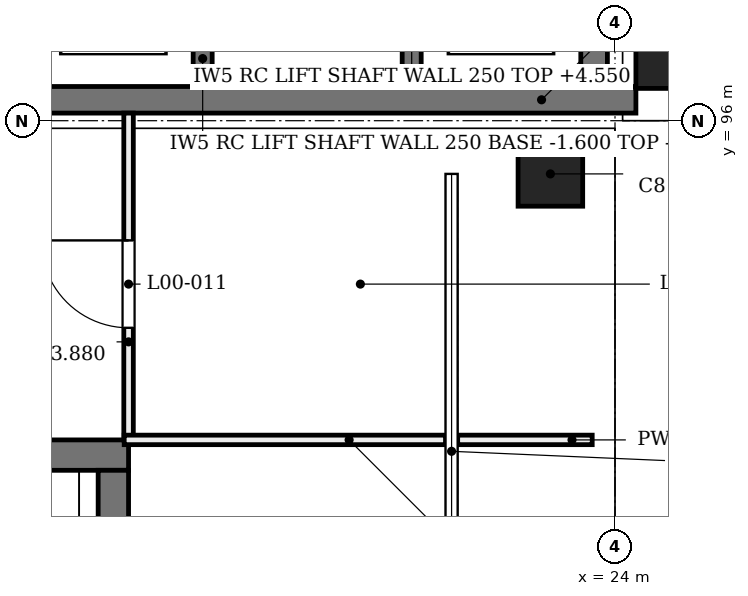
"""IFC4 building model, lengths in metres.
Left out: names, types, materials, properties, quantities, classifications, styles, units other than length and angle.
Written with IfcOpenShell. Run it as: python <this file> out.ifc"""

import sys

from ifc_helpers import new_model, si_unit, direction, frame, frame_2d, origin, origin_2d, place, context, subcontext, project, spatial, rectangle, extrude, element, fill, save


model = new_model("IFC4")
c1 = context("Model", 3, precision=1e-05, world=origin(), true_north=direction((0.0, 1.0)))
c2 = subcontext(c1, "Body", "Model", "MODEL_VIEW")
j1 = project(units=[si_unit("LENGTHUNIT", "METRE"), si_unit("PLANEANGLEUNIT", "RADIAN")], contexts=[c1])
p1 = place(None, origin())
s1 = spatial("IfcSite", under=j1, at=p1, CompositionType="ELEMENT")
p2 = place(p1, origin())
s2 = spatial("IfcBuilding", under=s1, at=p2, CompositionType="ELEMENT")
p3 = place(p2, origin())
s3 = spatial("IfcBuildingStorey", under=s2, at=p3, CompositionType="ELEMENT", Elevation=0.0)
p4 = place(p3, frame((8.4, 91.6, -1.6), z_axis=(0.0, 0.0, 1.0), x_axis=(1.0, 0.0, 0.0)))
e1 = element("IfcWall", 1, at=p4, inside=s3, PredefinedType="SHEAR", context=c2, shape_type="SweptSolid", body=[
    extrude(rectangle(XDim=9.2, YDim=0.4, at=frame_2d((4.6, 0.0))), origin(), (0.0, 0.0, 1.0), 6.18),
])
p5 = place(p4, frame((3.85, 0.0, 1.6)))
e2 = element("IfcOpeningElement", 2, at=p5, cuts=e1, PredefinedType="OPENING", context=c2, shape_type="SweptSolid", body=[
    extrude(rectangle(XDim=1.5, YDim=2.1, at=frame_2d((0.75, 1.05))), frame((0.0, 0.21, 0.0), z_axis=(0.0, -1.0, 0.0), x_axis=(1.0, 0.0, 0.0)), (0.0, 0.0, 1.0), 0.42),
])
p6 = place(p3, frame((17.4, 84.0, -1.6), z_axis=(0.0, 0.0, 1.0), x_axis=(0.0, 1.0, 0.0)))
e3 = element("IfcWall", 3, at=p6, inside=s3, PredefinedType="SHEAR", context=c2, shape_type="SweptSolid", body=[
    extrude(rectangle(XDim=7.4, YDim=0.4, at=frame_2d((3.7, 0.0))), origin(), (0.0, 0.0, 1.0), 6.18),
])
p7 = place(p6, frame((3.4, 0.0, 5.48)))
e4 = element("IfcOpeningElement", 4, at=p7, cuts=e3, PredefinedType="OPENING", context=c2, shape_type="SweptSolid", body=[
    extrude(rectangle(XDim=0.6, YDim=0.5, at=frame_2d((0.3, 0.25))), frame((0.0, 0.21, 0.0), z_axis=(0.0, -1.0, 0.0), x_axis=(1.0, 0.0, 0.0)), (0.0, 0.0, 1.0), 0.42),
])
p8 = place(p3, frame((16.0, 96.275, -1.6), z_axis=(0.0, 0.0, 1.0), x_axis=(1.0, 0.0, 0.0)))
e5 = element("IfcWall", 5, at=p8, inside=s3, PredefinedType="SHEAR", context=c2, shape_type="SweptSolid", body=[
    extrude(rectangle(XDim=8.275, YDim=0.35, at=frame_2d((4.137, 0.0))), origin(), (0.0, 0.0, 1.0), 6.18),
])
p9 = place(p3, frame((23.725, 96.45, -1.6), z_axis=(0.0, 0.0, 1.0), x_axis=(0.0, 1.0, 0.0)))
e6 = element("IfcWall", 6, at=p9, inside=s3, PredefinedType="SHEAR", context=c2, shape_type="SweptSolid", body=[
    extrude(rectangle(XDim=15.2, YDim=0.35, at=frame_2d((7.6, 0.0))), origin(), (0.0, 0.0, 1.0), 6.18),
])
p10 = place(p9, frame((13.1, 0.0, 1.6)))
e7 = element("IfcOpeningElement", 7, at=p10, cuts=e6, PredefinedType="OPENING", context=c2, shape_type="SweptSolid", body=[
    extrude(rectangle(XDim=1.0, YDim=2.1, at=frame_2d((0.5, 1.05))), frame((0.0, 0.185, 0.0), z_axis=(0.0, -1.0, 0.0), x_axis=(1.0, 0.0, 0.0)), (0.0, 0.0, 1.0), 0.37),
])
p11 = place(p9, frame((3.2, 0.0, 1.6)))
e8 = element("IfcOpeningElement", 8, at=p11, cuts=e6, PredefinedType="OPENING", context=c2, shape_type="SweptSolid", body=[
    extrude(rectangle(XDim=1.4, YDim=2.1, at=frame_2d((0.7, 1.05))), frame((0.0, 0.185, 0.0), z_axis=(0.0, -1.0, 0.0), x_axis=(1.0, 0.0, 0.0)), (0.0, 0.0, 1.0), 0.37),
])
for number, where, z_axis, x_axis in (
    (9, (24.7, 96.267, -1.6), (0.0, 0.204, 0.979), (-1.0, 0.0, 0.0)),
    (10, (16.333, 95.3, -1.6), (-0.204, 0.0, 0.979), (0.0, -1.0, 0.0)),
    (11, (23.733, 95.3, -1.6), (-0.204, 0.0, 0.979), (0.0, -1.0, 0.0)),
):
    element("IfcColumn", number, at=place(p3, frame(where, z_axis=z_axis, x_axis=x_axis)), inside=s3, PredefinedType="COLUMN", context=c2, shape_type="SweptSolid", body=[
        extrude(rectangle(XDim=0.85, YDim=0.85, at=origin_2d()), origin(), (0.0, 0.0, 1.0), 6.538),
    ])
p12 = place(p3, frame((21.85, 88.2, 4.1), z_axis=(0.0, 0.0, 1.0), x_axis=(0.0, 1.0, 0.0)))
e12 = element("IfcWall", 12, at=p12, inside=s3, PredefinedType="SOLIDWALL", context=c2, shape_type="SweptSolid", body=[
    extrude(rectangle(XDim=6.9, YDim=0.15, at=frame_2d((3.45, 0.0))), origin(), (0.0, 0.0, 1.0), 0.48),
])
p13 = place(p3, frame((18.575, 98.9, 0.0), z_axis=(0.0, 0.0, 1.0), x_axis=(0.0, -1.0, 0.0)))
e13 = element("IfcWall", 13, at=p13, inside=s3, PredefinedType="SOLIDWALL", context=c2, shape_type="SweptSolid", body=[
    extrude(rectangle(XDim=2.45, YDim=0.25, at=frame_2d((1.225, 0.0))), origin(), (0.0, 0.0, 1.0), 4.55),
])
p14 = place(p3, frame((18.575, 98.9, -1.6), z_axis=(0.0, 0.0, 1.0), x_axis=(0.0, -1.0, 0.0)))
e14 = element("IfcWall", 14, at=p14, inside=s3, PredefinedType="SOLIDWALL", context=c2, shape_type="SweptSolid", body=[
    extrude(rectangle(XDim=2.45, YDim=0.25, at=frame_2d((1.225, 0.0))), origin(), (0.0, 0.0, 1.0), 1.35),
])
p15 = place(p3, frame((21.325, 98.9, 0.0), z_axis=(0.0, 0.0, 1.0), x_axis=(0.0, -1.0, 0.0)))
e15 = element("IfcWall", 15, at=p15, inside=s3, PredefinedType="SOLIDWALL", context=c2, shape_type="SweptSolid", body=[
    extrude(rectangle(XDim=2.45, YDim=0.25, at=frame_2d((1.225, 0.0))), origin(), (0.0, 0.0, 1.0), 4.55),
])
p16 = place(p3, frame((21.325, 98.9, -1.6), z_axis=(0.0, 0.0, 1.0), x_axis=(0.0, -1.0, 0.0)))
e16 = element("IfcWall", 16, at=p16, inside=s3, PredefinedType="SOLIDWALL", context=c2, shape_type="SweptSolid", body=[
    extrude(rectangle(XDim=2.45, YDim=0.25, at=frame_2d((1.225, 0.0))), origin(), (0.0, 0.0, 1.0), 1.35),
])
p17 = place(p3, frame((17.6, 91.8, 0.0), z_axis=(0.0, 0.0, 1.0), x_axis=(0.0, 1.0, 0.0)))
e17 = element("IfcWall", 17, at=p17, inside=s3, PredefinedType="PARTITIONING", context=c2, shape_type="SweptSolid", body=[
    extrude(rectangle(XDim=4.3, YDim=0.125, at=frame_2d((2.15, 0.0))), origin(), (0.0, 0.0, 1.0), 3.88),
])
p18 = place(p17, frame((1.475, 0.0, 0.0)))
e18 = element("IfcOpeningElement", 18, at=p18, cuts=e17, PredefinedType="OPENING", context=c2, shape_type="SweptSolid", body=[
    extrude(rectangle(XDim=1.15, YDim=2.1, at=frame_2d((0.575, 1.05))), frame((0.0, 0.073, 0.0), z_axis=(0.0, -1.0, 0.0), x_axis=(1.0, 0.0, 0.0)), (0.0, 0.0, 1.0), 0.145),
])
p19 = place(p3, frame((17.542, 91.8, 0.0), z_axis=(0.0, 0.0, 1.0), x_axis=(1.0, 0.0, 0.0)))
e19 = element("IfcWall", 19, at=p19, inside=s3, PredefinedType="PARTITIONING", context=c2, shape_type="SweptSolid", body=[
    extrude(rectangle(XDim=4.228, YDim=0.125, at=frame_2d((2.114, 0.0))), origin(), (0.0, 0.0, 1.0), 4.56),
])
p20 = place(p3, frame((21.93, 91.8, 0.0), z_axis=(0.0, 0.0, 1.0), x_axis=(1.0, 0.0, 0.0)))
e20 = element("IfcWall", 20, at=p20, inside=s3, PredefinedType="PARTITIONING", context=c2, shape_type="SweptSolid", body=[
    extrude(rectangle(XDim=1.77, YDim=0.125, at=frame_2d((0.885, 0.0))), origin(), (0.0, 0.0, 1.0), 3.88),
])
p21 = place(p18, frame((1.15, 0.0, 0.0), z_axis=(0.0, 0.0, 1.0), x_axis=(-1.0, 0.0, 0.0)))
e21 = element("IfcDoor", 21, at=p21, inside=s3, OperationType="SINGLE_SWING_RIGHT", PredefinedType="DOOR", context=c2, shape_type="SweptSolid", body=[
    extrude(rectangle(XDim=1.15, YDim=2.1, at=frame_2d((0.575, 1.05))), frame((0.0, 0.025, 0.0), z_axis=(0.0, -1.0, 0.0), x_axis=(1.0, 0.0, 0.0)), (0.0, 0.0, 1.0), 0.05),
])
fill(e18, e21)
save(model, sys.argv[1])
